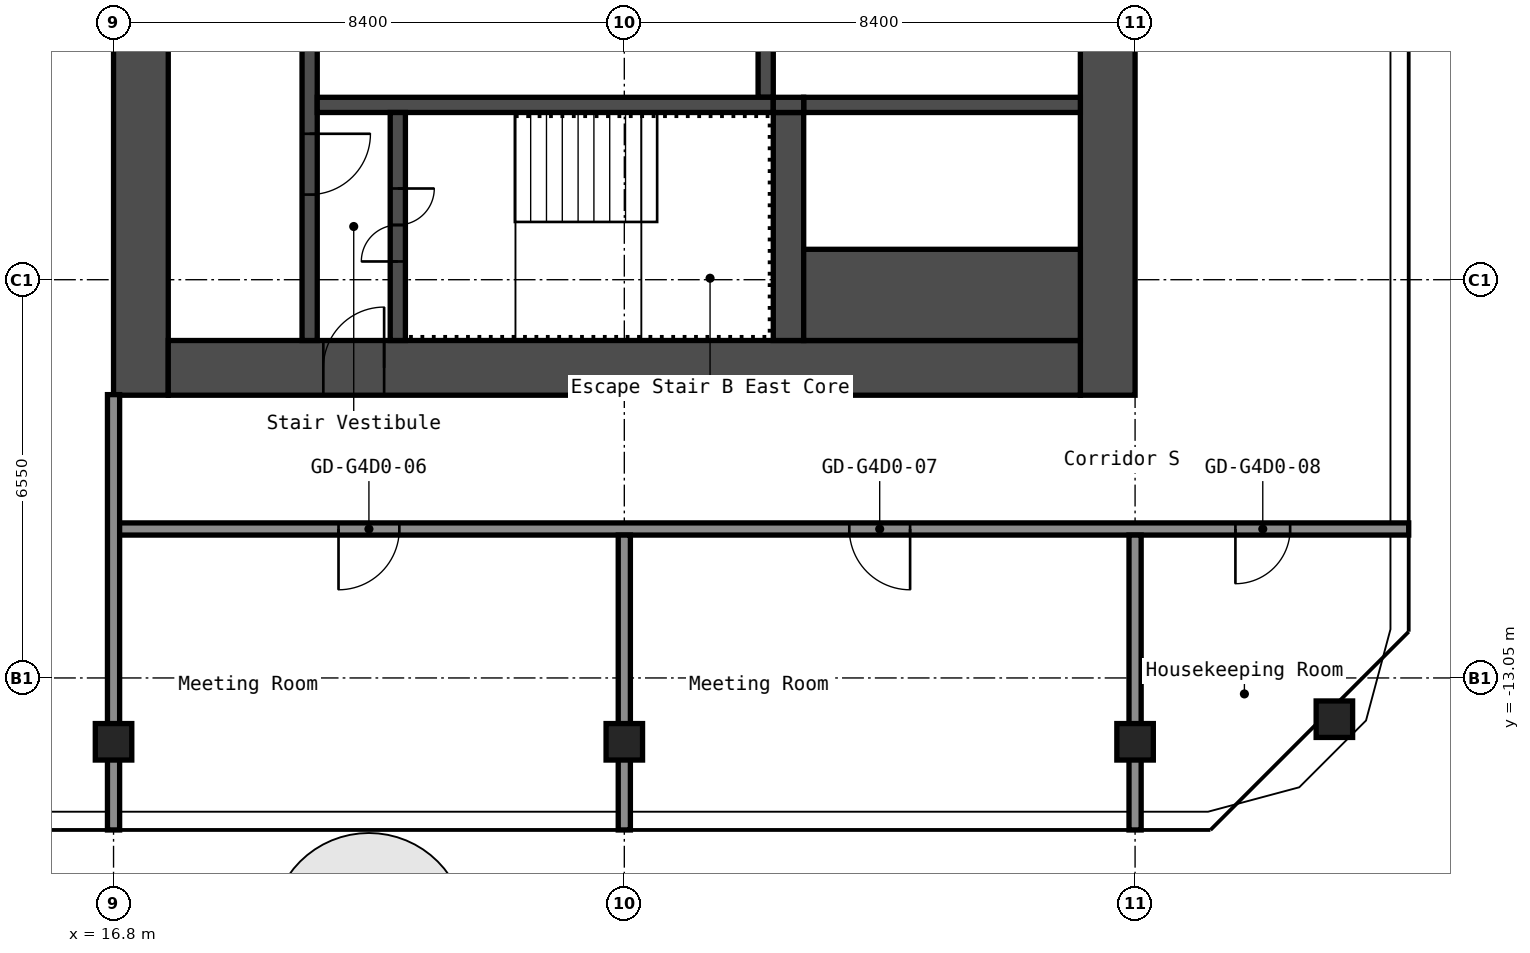
"""IFC4 building model, lengths in metres.
Left out: names, types, materials, properties, quantities, classifications, styles, units other than length and angle.
Written with IfcOpenShell. Run it as: python <this file> out.ifc"""

import sys

from ifc_helpers import new_model, si_unit, direction, frame, frame_2d, origin, origin_2d, place, context, subcontext, project, spatial, rectangle, hollow_rectangle, extrude, element, fill, save


model = new_model("IFC4")
c1 = context("Model", 3, precision=1e-05, world=origin(), true_north=direction((0.0, 1.0)))
c2 = subcontext(c1, "Body", "Model", "MODEL_VIEW")
j1 = project(units=[si_unit("LENGTHUNIT", "METRE"), si_unit("PLANEANGLEUNIT", "RADIAN")], contexts=[c1])
p1 = place(None, origin())
s1 = spatial("IfcSite", under=j1, at=p1, CompositionType="ELEMENT")
p2 = place(p1, origin())
s2 = spatial("IfcBuilding", under=s1, at=p2, CompositionType="ELEMENT")
p3 = place(p2, frame((0.0, 0.0, 196.2)))
s3 = spatial("IfcBuildingStorey", under=s2, at=p3, CompositionType="ELEMENT", Elevation=196.2)
for number, where, z_axis, x_axis in (
    (1, (16.8, -14.1, 0.0), (0.0, 0.0, 1.0), (1.0, 0.0, 0.0)),
    (2, (25.2, -14.1, 0.0), (0.0, 0.0, 1.0), (1.0, 0.0, 0.0)),
    (3, (33.6, -14.1, 0.0), (0.0, 0.0, 1.0), (1.0, 0.0, 0.0)),
    (4, (36.878, -13.729, 0.0), (0.0, 0.0, 1.0), (1.0, 0.0, 0.0)),
):
    element("IfcColumn", number, at=place(p3, frame(where, z_axis=z_axis, x_axis=x_axis)), inside=s3, PredefinedType="COLUMN", context=c2, shape_type="SweptSolid", body=[
        extrude(hollow_rectangle(XDim=0.6, YDim=0.6, WallThickness=0.025, InnerFilletRadius=0.038, OuterFilletRadius=0.062, at=origin_2d()), origin(), (0.0, 0.0, 1.0), 2.75),
    ])
p4 = place(p3, frame((17.25, -8.4, 0.0), z_axis=(0.0, 0.0, 1.0), x_axis=(0.0, 1.0, 0.0)))
e5 = element("IfcWall", 5, at=p4, inside=s3, PredefinedType="SHEAR", context=c2, shape_type="SweptSolid", body=[
    extrude(rectangle(XDim=16.8, YDim=0.9, at=frame_2d((8.4, 0.0))), origin(), (0.0, 0.0, 1.0), 2.75),
])
p5 = place(p4, frame((10.1, 0.0, 0.0)))
e6 = element("IfcOpeningElement", 6, at=p5, cuts=e5, PredefinedType="OPENING", context=c2, shape_type="SweptSolid", body=[
    extrude(rectangle(XDim=1.6, YDim=2.1, at=frame_2d((0.8, 1.05))), frame((0.0, 0.46, 0.0), z_axis=(0.0, -1.0, 0.0), x_axis=(1.0, 0.0, 0.0)), (0.0, 0.0, 1.0), 0.92),
])
p6 = place(p3, frame((33.15, -8.4, 0.0), z_axis=(0.0, 0.0, 1.0), x_axis=(0.0, 1.0, 0.0)))
e7 = element("IfcWall", 7, at=p6, inside=s3, PredefinedType="SHEAR", context=c2, shape_type="SweptSolid", body=[
    extrude(rectangle(XDim=16.8, YDim=0.9, at=frame_2d((8.4, 0.0))), origin(), (0.0, 0.0, 1.0), 2.75),
])
p7 = place(p3, frame((17.7, -7.95, 0.0), z_axis=(0.0, 0.0, 1.0), x_axis=(1.0, 0.0, 0.0)))
e8 = element("IfcWall", 8, at=p7, inside=s3, PredefinedType="SHEAR", context=c2, shape_type="SweptSolid", body=[
    extrude(rectangle(XDim=15.0, YDim=0.9, at=frame_2d((7.5, 0.0))), origin(), (0.0, 0.0, 1.0), 2.75),
])
p8 = place(p7, frame((2.55, 0.0, 0.0)))
e9 = element("IfcOpeningElement", 9, at=p8, cuts=e8, PredefinedType="OPENING", context=c2, shape_type="SweptSolid", body=[
    extrude(rectangle(XDim=1.0, YDim=2.1, at=frame_2d((0.5, 1.05))), frame((0.0, 0.46, 0.0), z_axis=(0.0, -1.0, 0.0), x_axis=(1.0, 0.0, 0.0)), (0.0, 0.0, 1.0), 0.92),
])
p9 = place(p3, frame((20.025, -7.5, 0.0), z_axis=(0.0, 0.0, 1.0), x_axis=(0.0, 1.0, 0.0)))
e10 = element("IfcWall", 10, at=p9, inside=s3, PredefinedType="SHEAR", context=c2, shape_type="SweptSolid", body=[
    extrude(rectangle(XDim=6.3, YDim=0.25, at=frame_2d((3.15, 0.0))), origin(), (0.0, 0.0, 1.0), 2.75),
])
p10 = place(p9, frame((2.4, 0.0, 0.0)))
e11 = element("IfcOpeningElement", 11, at=p10, cuts=e10, PredefinedType="OPENING", context=c2, shape_type="SweptSolid", body=[
    extrude(rectangle(XDim=1.0, YDim=2.1, at=frame_2d((0.5, 1.05))), frame((0.0, 0.135, 0.0), z_axis=(0.0, -1.0, 0.0), x_axis=(1.0, 0.0, 0.0)), (0.0, 0.0, 1.0), 0.27),
])
p11 = place(p3, frame((27.525, -3.5, 0.0), z_axis=(0.0, 0.0, 1.0), x_axis=(0.0, 1.0, 0.0)))
e12 = element("IfcWall", 12, at=p11, inside=s3, PredefinedType="SHEAR", context=c2, shape_type="SweptSolid", body=[
    extrude(rectangle(XDim=2.05, YDim=0.25, at=frame_2d((1.025, 0.0))), origin(), (0.0, 0.0, 1.0), 2.75),
])
p12 = place(p3, frame((20.15, -3.625, 0.0), z_axis=(0.0, 0.0, 1.0), x_axis=(1.0, 0.0, 0.0)))
e13 = element("IfcWall", 13, at=p12, inside=s3, PredefinedType="SHEAR", context=c2, shape_type="SweptSolid", body=[
    extrude(rectangle(XDim=7.5, YDim=0.25, at=frame_2d((3.75, 0.0))), origin(), (0.0, 0.0, 1.0), 2.75),
])
p13 = place(p3, frame((21.475, -7.5, 0.0), z_axis=(0.0, 0.0, 1.0), x_axis=(0.0, 1.0, 0.0)))
e14 = element("IfcWall", 14, at=p13, inside=s3, PredefinedType="SHEAR", context=c2, shape_type="SweptSolid", body=[
    extrude(rectangle(XDim=3.75, YDim=0.25, at=frame_2d((1.875, 0.0))), origin(), (0.0, 0.0, 1.0), 2.75),
])
p14 = place(p13, frame((1.3, 0.0, 0.0)))
e15 = element("IfcOpeningElement", 15, at=p14, cuts=e14, PredefinedType="OPENING", context=c2, shape_type="SweptSolid", body=[
    extrude(rectangle(XDim=1.2, YDim=2.1, at=frame_2d((0.6, 1.05))), frame((0.0, 0.135, 0.0), z_axis=(0.0, -1.0, 0.0), x_axis=(1.0, 0.0, 0.0)), (0.0, 0.0, 1.0), 0.27),
])
p15 = place(p3, frame((27.9, -7.5, 0.0), z_axis=(0.0, 0.0, 1.0), x_axis=(0.0, 1.0, 0.0)))
e16 = element("IfcWall", 16, at=p15, inside=s3, PredefinedType="SHEAR", context=c2, shape_type="SweptSolid", body=[
    extrude(rectangle(XDim=3.75, YDim=0.5, at=frame_2d((1.875, 0.0))), origin(), (0.0, 0.0, 1.0), 2.75),
])
p16 = place(p3, frame((28.15, -3.625, 0.0), z_axis=(0.0, 0.0, 1.0), x_axis=(1.0, 0.0, 0.0)))
e17 = element("IfcWall", 17, at=p16, inside=s3, PredefinedType="SHEAR", context=c2, shape_type="SweptSolid", body=[
    extrude(rectangle(XDim=4.55, YDim=0.25, at=frame_2d((2.275, 0.0))), origin(), (0.0, 0.0, 1.0), 2.75),
])
p17 = place(p3, frame((28.15, -6.75, 0.0), z_axis=(0.0, 0.0, 1.0), x_axis=(1.0, 0.0, 0.0)))
e18 = element("IfcWall", 18, at=p17, inside=s3, PredefinedType="SHEAR", context=c2, shape_type="SweptSolid", body=[
    extrude(rectangle(XDim=4.55, YDim=1.5, at=frame_2d((2.275, 0.0))), origin(), (0.0, 0.0, 1.0), 2.75),
])
p18 = place(p3, frame((27.65, -3.625, 0.0), z_axis=(0.0, 0.0, 1.0), x_axis=(1.0, 0.0, 0.0)))
e19 = element("IfcWall", 19, at=p18, inside=s3, PredefinedType="SHEAR", context=c2, shape_type="SweptSolid", body=[
    extrude(rectangle(XDim=0.5, YDim=0.25, at=frame_2d((0.25, 0.0))), origin(), (0.0, 0.0, 1.0), 2.75),
])
p19 = place(p3, frame((16.8, -10.6, 0.0), z_axis=(0.0, 0.0, 1.0), x_axis=(1.0, 0.0, 0.0)))
e20 = element("IfcWall", 20, at=p19, inside=s3, PredefinedType="PARTITIONING", context=c2, shape_type="SweptSolid", body=[
    extrude(rectangle(XDim=21.3, YDim=0.2, at=frame_2d((10.65, 0.0))), origin(), (0.0, 0.0, 1.0), 2.75),
])
p20 = place(p19, frame((3.7, 0.0, 0.0)))
e21 = element("IfcOpeningElement", 21, at=p20, cuts=e20, PredefinedType="OPENING", context=c2, shape_type="SweptSolid", body=[
    extrude(rectangle(XDim=1.0, YDim=2.1, at=frame_2d((0.5, 1.05))), frame((0.0, 0.11, 0.0), z_axis=(0.0, -1.0, 0.0), x_axis=(1.0, 0.0, 0.0)), (0.0, 0.0, 1.0), 0.22),
])
p21 = place(p19, frame((12.1, 0.0, 0.0)))
e22 = element("IfcOpeningElement", 22, at=p21, cuts=e20, PredefinedType="OPENING", context=c2, shape_type="SweptSolid", body=[
    extrude(rectangle(XDim=1.0, YDim=2.1, at=frame_2d((0.5, 1.05))), frame((0.0, 0.11, 0.0), z_axis=(0.0, -1.0, 0.0), x_axis=(1.0, 0.0, 0.0)), (0.0, 0.0, 1.0), 0.22),
])
p22 = place(p19, frame((18.45, 0.0, 0.0)))
e23 = element("IfcOpeningElement", 23, at=p22, cuts=e20, PredefinedType="OPENING", context=c2, shape_type="SweptSolid", body=[
    extrude(rectangle(XDim=0.9, YDim=2.1, at=frame_2d((0.45, 1.05))), frame((0.0, 0.11, 0.0), z_axis=(0.0, -1.0, 0.0), x_axis=(1.0, 0.0, 0.0)), (0.0, 0.0, 1.0), 0.22),
])
p23 = place(p3, frame((16.8, -15.55, 0.0), z_axis=(0.0, 0.0, 1.0), x_axis=(0.0, 1.0, 0.0)))
e24 = element("IfcWall", 24, at=p23, inside=s3, PredefinedType="PARTITIONING", context=c2, shape_type="SweptSolid", body=[
    extrude(rectangle(XDim=7.16, YDim=0.2, at=frame_2d((3.58, 0.0))), origin(), (0.0, 0.0, 1.0), 2.75),
])
for number, where, z_axis, x_axis in (
    (25, (25.2, -15.55, 0.0), (0.0, 0.0, 1.0), (0.0, 1.0, 0.0)),
    (26, (33.6, -15.55, 0.0), (0.0, 0.0, 1.0), (0.0, 1.0, 0.0)),
):
    element("IfcWall", number, at=place(p3, frame(where, z_axis=z_axis, x_axis=x_axis)), inside=s3, PredefinedType="PARTITIONING", context=c2, shape_type="SweptSolid", body=[
        extrude(rectangle(XDim=4.85, YDim=0.2, at=frame_2d((2.425, 0.0))), origin(), (0.0, 0.0, 1.0), 2.75),
    ])
p24 = place(p8, origin())
e27 = element("IfcDoor", 27, at=p24, inside=s3, OperationType="SINGLE_SWING_LEFT", PredefinedType="DOOR", context=c2, shape_type="SweptSolid", body=[
    extrude(rectangle(XDim=1.0, YDim=2.1, at=frame_2d((0.5, 1.05))), frame((0.0, 0.025, 0.0), z_axis=(0.0, -1.0, 0.0), x_axis=(1.0, 0.0, 0.0)), (0.0, 0.0, 1.0), 0.05),
])
fill(e9, e27)
p25 = place(p14, origin())
e28 = element("IfcDoor", 28, at=p25, inside=s3, OperationType="DOUBLE_DOOR_SINGLE_SWING", PredefinedType="DOOR", context=c2, shape_type="SweptSolid", body=[
    extrude(rectangle(XDim=1.2, YDim=2.1, at=frame_2d((0.6, 1.05))), frame((0.0, 0.025, 0.0), z_axis=(0.0, -1.0, 0.0), x_axis=(1.0, 0.0, 0.0)), (0.0, 0.0, 1.0), 0.05),
])
fill(e15, e28)
p26 = place(p10, origin())
e29 = element("IfcDoor", 29, at=p26, inside=s3, OperationType="SINGLE_SWING_RIGHT", PredefinedType="DOOR", context=c2, shape_type="SweptSolid", body=[
    extrude(rectangle(XDim=1.0, YDim=2.1, at=frame_2d((0.5, 1.05))), frame((0.0, 0.025, 0.0), z_axis=(0.0, -1.0, 0.0), x_axis=(1.0, 0.0, 0.0)), (0.0, 0.0, 1.0), 0.05),
])
fill(e11, e29)
p27 = place(p20, origin())
e30 = element("IfcDoor", 30, at=p27, inside=s3, OperationType="SINGLE_SWING_LEFT", PredefinedType="DOOR", context=c2, shape_type="SweptSolid", body=[
    extrude(rectangle(XDim=1.0, YDim=2.1, at=frame_2d((0.5, 1.05))), frame((0.0, 0.025, 0.0), z_axis=(0.0, -1.0, 0.0), x_axis=(1.0, 0.0, 0.0)), (0.0, 0.0, 1.0), 0.05),
])
fill(e21, e30)
p28 = place(p21, origin())
e31 = element("IfcDoor", 31, at=p28, inside=s3, OperationType="SINGLE_SWING_RIGHT", PredefinedType="DOOR", context=c2, shape_type="SweptSolid", body=[
    extrude(rectangle(XDim=1.0, YDim=2.1, at=frame_2d((0.5, 1.05))), frame((0.0, 0.025, 0.0), z_axis=(0.0, -1.0, 0.0), x_axis=(1.0, 0.0, 0.0)), (0.0, 0.0, 1.0), 0.05),
])
fill(e22, e31)
p29 = place(p22, origin())
e32 = element("IfcDoor", 32, at=p29, inside=s3, OperationType="SINGLE_SWING_LEFT", PredefinedType="DOOR", context=c2, shape_type="SweptSolid", body=[
    extrude(rectangle(XDim=0.9, YDim=2.1, at=frame_2d((0.45, 1.05))), frame((0.0, 0.025, 0.0), z_axis=(0.0, -1.0, 0.0), x_axis=(1.0, 0.0, 0.0)), (0.0, 0.0, 1.0), 0.05),
])
fill(e23, e32)
save(model, sys.argv[1])
